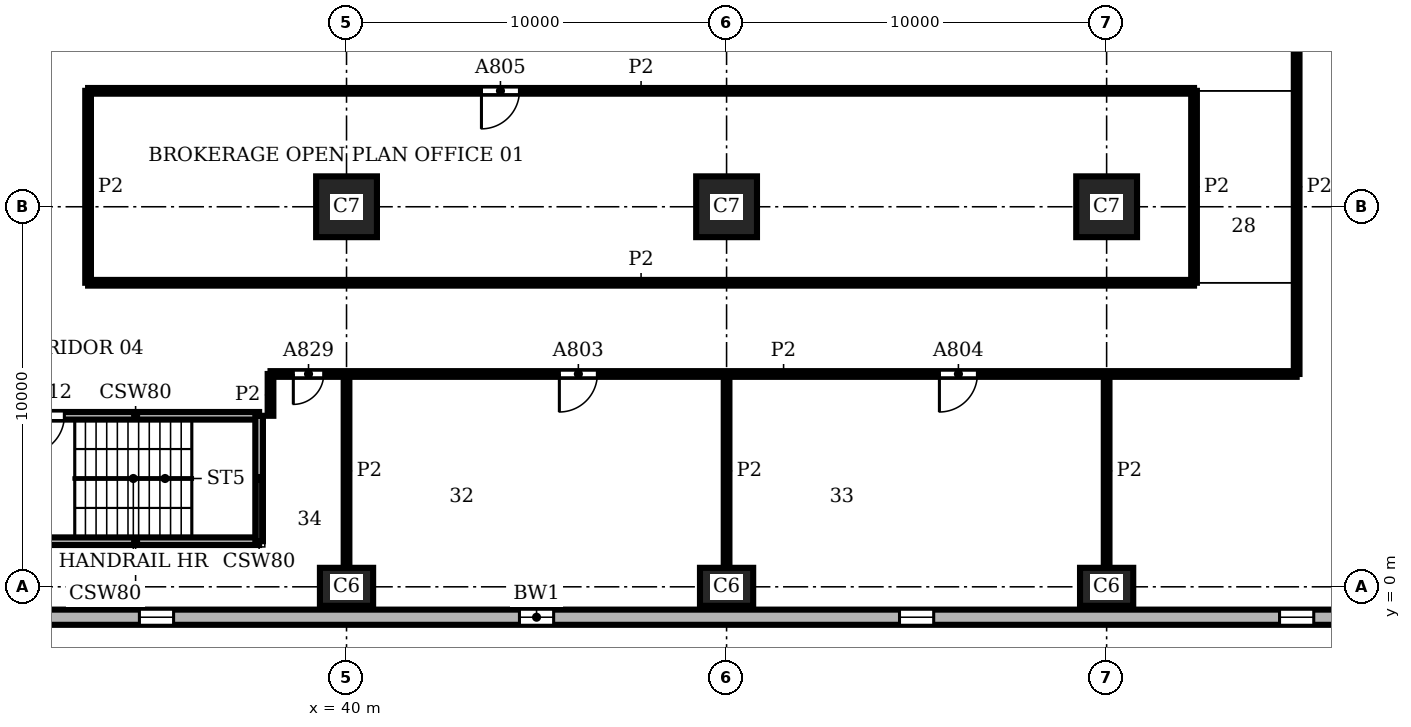
"""IFC4 building model, lengths in metres.
Left out: names, types, materials, properties, quantities, classifications, styles, units other than length and angle.
Written with IfcOpenShell. Run it as: python <this file> out.ifc"""

import sys

from ifc_helpers import new_model, si_unit, direction, frame, frame_2d, origin, origin_2d, place, context, subcontext, project, spatial, rectangle, extrude, element, fill, save


model = new_model("IFC4")
c1 = context("Model", 3, precision=1e-05, world=origin(), true_north=direction((0.0, 1.0)))
c2 = subcontext(c1, "Body", "Model", "MODEL_VIEW")
j1 = project(units=[si_unit("LENGTHUNIT", "METRE"), si_unit("PLANEANGLEUNIT", "RADIAN")], contexts=[c1])
p1 = place(None, origin())
s1 = spatial("IfcSite", under=j1, at=p1, CompositionType="ELEMENT")
p2 = place(p1, origin())
s2 = spatial("IfcBuilding", under=s1, at=p2, CompositionType="ELEMENT")
p3 = place(p2, frame((0.0, 0.0, 93.9)))
s3 = spatial("IfcBuildingStorey", under=s2, at=p3, CompositionType="ELEMENT", Elevation=93.9)
for number, where, z_axis, x_axis in (
    (1, (40.0, 0.0, 0.0), (0.0, 0.0, 1.0), (1.0, 0.0, 0.0)),
    (2, (50.0, 0.0, 0.0), (0.0, 0.0, 1.0), (1.0, 0.0, 0.0)),
    (3, (60.0, 0.0, 0.0), (0.0, 0.0, 1.0), (1.0, 0.0, 0.0)),
):
    element("IfcColumn", number, at=place(p3, frame(where, z_axis=z_axis, x_axis=x_axis)), inside=s3, PredefinedType="COLUMN", context=c2, shape_type="SweptSolid", body=[
        extrude(rectangle(XDim=1.4, YDim=1.0, at=origin_2d()), origin(), (0.0, 0.0, 1.0), 3.9),
    ])
for number, where, z_axis, x_axis in (
    (4, (40.0, 10.0, 0.0), (0.0, 0.0, 1.0), (1.0, 0.0, 0.0)),
    (5, (50.0, 10.0, 0.0), (0.0, 0.0, 1.0), (1.0, 0.0, 0.0)),
    (6, (60.0, 10.0, 0.0), (0.0, 0.0, 1.0), (1.0, 0.0, 0.0)),
):
    element("IfcColumn", number, at=place(p3, frame(where, z_axis=z_axis, x_axis=x_axis)), inside=s3, PredefinedType="COLUMN", context=c2, shape_type="SweptSolid", body=[
        extrude(rectangle(XDim=1.6, YDim=1.6, at=origin_2d()), origin(), (0.0, 0.0, 1.0), 3.9),
    ])
p4 = place(p3, frame((20.8, -0.8, 0.0), z_axis=(0.0, 0.0, 1.0), x_axis=(1.0, 0.0, 0.0)))
e7 = element("IfcWall", 7, at=p4, inside=s3, PredefinedType="SOLIDWALL", context=c2, shape_type="SweptSolid", body=[
    extrude(rectangle(XDim=48.4, YDim=0.4, at=frame_2d((24.2, 0.0))), origin(), (0.0, 0.0, 1.0), 3.9),
])
p5 = place(p4, frame((3.75, 0.0, 0.9)))
e8 = element("IfcOpeningElement", 8, at=p5, cuts=e7, PredefinedType="OPENING", context=c2, shape_type="SweptSolid", body=[
    extrude(rectangle(XDim=0.9, YDim=2.35, at=frame_2d((0.45, 1.175))), frame((0.0, 0.21, 0.0), z_axis=(0.0, -1.0, 0.0), x_axis=(1.0, 0.0, 0.0)), (0.0, 0.0, 1.0), 0.42),
])
p6 = place(p4, frame((13.75, 0.0, 0.9)))
e9 = element("IfcOpeningElement", 9, at=p6, cuts=e7, PredefinedType="OPENING", context=c2, shape_type="SweptSolid", body=[
    extrude(rectangle(XDim=0.9, YDim=2.35, at=frame_2d((0.45, 1.175))), frame((0.0, 0.21, 0.0), z_axis=(0.0, -1.0, 0.0), x_axis=(1.0, 0.0, 0.0)), (0.0, 0.0, 1.0), 0.42),
])
p7 = place(p4, frame((23.75, 0.0, 0.9)))
e10 = element("IfcOpeningElement", 10, at=p7, cuts=e7, PredefinedType="OPENING", context=c2, shape_type="SweptSolid", body=[
    extrude(rectangle(XDim=0.9, YDim=2.35, at=frame_2d((0.45, 1.175))), frame((0.0, 0.21, 0.0), z_axis=(0.0, -1.0, 0.0), x_axis=(1.0, 0.0, 0.0)), (0.0, 0.0, 1.0), 0.42),
])
p8 = place(p4, frame((33.75, 0.0, 0.9)))
e11 = element("IfcOpeningElement", 11, at=p8, cuts=e7, PredefinedType="OPENING", context=c2, shape_type="SweptSolid", body=[
    extrude(rectangle(XDim=0.9, YDim=2.35, at=frame_2d((0.45, 1.175))), frame((0.0, 0.21, 0.0), z_axis=(0.0, -1.0, 0.0), x_axis=(1.0, 0.0, 0.0)), (0.0, 0.0, 1.0), 0.42),
])
p9 = place(p4, frame((43.75, 0.0, 0.9)))
e12 = element("IfcOpeningElement", 12, at=p9, cuts=e7, PredefinedType="OPENING", context=c2, shape_type="SweptSolid", body=[
    extrude(rectangle(XDim=0.9, YDim=2.35, at=frame_2d((0.45, 1.175))), frame((0.0, 0.21, 0.0), z_axis=(0.0, -1.0, 0.0), x_axis=(1.0, 0.0, 0.0)), (0.0, 0.0, 1.0), 0.42),
])
p10 = place(p3, frame((31.2, 1.2, 0.0), z_axis=(0.0, 0.0, 1.0), x_axis=(1.0, 0.0, 0.0)))
e13 = element("IfcWall", 13, at=p10, inside=s3, PredefinedType="SHEAR", context=c2, shape_type="SweptSolid", body=[
    extrude(rectangle(XDim=6.5, YDim=0.2, at=frame_2d((3.25, 0.0))), origin(), (0.0, 0.0, 1.0), 3.58),
])
p11 = place(p3, frame((31.2, 4.5, 0.0), z_axis=(0.0, 0.0, 1.0), x_axis=(1.0, 0.0, 0.0)))
e14 = element("IfcWall", 14, at=p11, inside=s3, PredefinedType="SHEAR", context=c2, shape_type="SweptSolid", body=[
    extrude(rectangle(XDim=6.5, YDim=0.2, at=frame_2d((3.25, 0.0))), origin(), (0.0, 0.0, 1.0), 3.58),
])
p12 = place(p11, frame((0.375, 0.0, 0.0)))
e15 = element("IfcOpeningElement", 15, at=p12, cuts=e14, PredefinedType="OPENING", context=c2, shape_type="SweptSolid", body=[
    extrude(rectangle(XDim=1.0, YDim=2.1, at=frame_2d((0.5, 1.05))), frame((0.0, 0.11, 0.0), z_axis=(0.0, -1.0, 0.0), x_axis=(1.0, 0.0, 0.0)), (0.0, 0.0, 1.0), 0.22),
])
p13 = place(p3, frame((37.7, 1.2, 0.0), z_axis=(0.0, 0.0, 1.0), x_axis=(0.0, 1.0, 0.0)))
e16 = element("IfcWall", 16, at=p13, inside=s3, PredefinedType="SHEAR", context=c2, shape_type="SweptSolid", body=[
    extrude(rectangle(XDim=3.3, YDim=0.2, at=frame_2d((1.65, 0.0))), origin(), (0.0, 0.0, 1.0), 3.58),
])
p14 = place(p3, frame((33.2, 8.0, 0.0), z_axis=(0.0, 0.0, 1.0), x_axis=(0.0, 1.0, 0.0)))
e17 = element("IfcWall", 17, at=p14, inside=s3, PredefinedType="PARTITIONING", context=c2, shape_type="SweptSolid", body=[
    extrude(rectangle(XDim=5.05, YDim=0.15, at=frame_2d((2.525, 0.0))), origin(), (0.0, 0.0, 1.0), 3.58),
])
p15 = place(p3, frame((38.0, 4.5, 0.0), z_axis=(0.0, 0.0, 1.0), x_axis=(0.0, 1.0, 0.0)))
e18 = element("IfcWall", 18, at=p15, inside=s3, PredefinedType="PARTITIONING", context=c2, shape_type="SweptSolid", body=[
    extrude(rectangle(XDim=1.1, YDim=0.15, at=frame_2d((0.55, 0.0))), origin(), (0.0, 0.0, 1.0), 3.58),
])
for number, where, z_axis, x_axis in (
    (19, (40.0, 0.5, 0.0), (0.0, 0.0, 1.0), (0.0, 1.0, 0.0)),
    (20, (50.0, 0.5, 0.0), (0.0, 0.0, 1.0), (0.0, 1.0, 0.0)),
    (21, (60.0, 0.5, 0.0), (0.0, 0.0, 1.0), (0.0, 1.0, 0.0)),
):
    element("IfcWall", number, at=place(p3, frame(where, z_axis=z_axis, x_axis=x_axis)), inside=s3, PredefinedType="PARTITIONING", context=c2, shape_type="SweptSolid", body=[
        extrude(rectangle(XDim=5.1, YDim=0.15, at=frame_2d((2.55, 0.0))), origin(), (0.0, 0.0, 1.0), 3.58),
    ])
p16 = place(p3, frame((62.3, 8.0, 0.0), z_axis=(0.0, 0.0, 1.0), x_axis=(0.0, 1.0, 0.0)))
e22 = element("IfcWall", 22, at=p16, inside=s3, PredefinedType="PARTITIONING", context=c2, shape_type="SweptSolid", body=[
    extrude(rectangle(XDim=5.05, YDim=0.15, at=frame_2d((2.525, 0.0))), origin(), (0.0, 0.0, 1.0), 3.58),
])
p17 = place(p3, frame((65.0, 5.6, 0.0), z_axis=(0.0, 0.0, 1.0), x_axis=(0.0, 1.0, 0.0)))
e23 = element("IfcWall", 23, at=p17, inside=s3, PredefinedType="PARTITIONING", context=c2, shape_type="SweptSolid", body=[
    extrude(rectangle(XDim=9.85, YDim=0.15, at=frame_2d((4.925, 0.0))), origin(), (0.0, 0.0, 1.0), 3.58),
])
p18 = place(p3, frame((38.0, 5.6, 0.0), z_axis=(0.0, 0.0, 1.0), x_axis=(1.0, 0.0, 0.0)))
e24 = element("IfcWall", 24, at=p18, inside=s3, PredefinedType="PARTITIONING", context=c2, shape_type="SweptSolid", body=[
    extrude(rectangle(XDim=27.0, YDim=0.15, at=frame_2d((13.5, 0.0))), origin(), (0.0, 0.0, 1.0), 3.58),
])
p19 = place(p18, frame((7.6, 0.0, 0.0)))
e25 = element("IfcOpeningElement", 25, at=p19, cuts=e24, PredefinedType="OPENING", context=c2, shape_type="SweptSolid", body=[
    extrude(rectangle(XDim=1.0, YDim=2.1, at=frame_2d((0.5, 1.05))), frame((0.0, 0.085, 0.0), z_axis=(0.0, -1.0, 0.0), x_axis=(1.0, 0.0, 0.0)), (0.0, 0.0, 1.0), 0.17),
])
p20 = place(p18, frame((17.6, 0.0, 0.0)))
e26 = element("IfcOpeningElement", 26, at=p20, cuts=e24, PredefinedType="OPENING", context=c2, shape_type="SweptSolid", body=[
    extrude(rectangle(XDim=1.0, YDim=2.1, at=frame_2d((0.5, 1.05))), frame((0.0, 0.085, 0.0), z_axis=(0.0, -1.0, 0.0), x_axis=(1.0, 0.0, 0.0)), (0.0, 0.0, 1.0), 0.17),
])
p21 = place(p18, frame((0.6, 0.0, 0.0)))
e27 = element("IfcOpeningElement", 27, at=p21, cuts=e24, PredefinedType="OPENING", context=c2, shape_type="SweptSolid", body=[
    extrude(rectangle(XDim=0.8, YDim=2.1, at=frame_2d((0.4, 1.05))), frame((0.0, 0.085, 0.0), z_axis=(0.0, -1.0, 0.0), x_axis=(1.0, 0.0, 0.0)), (0.0, 0.0, 1.0), 0.17),
])
p22 = place(p3, frame((33.2, 8.0, 0.0), z_axis=(0.0, 0.0, 1.0), x_axis=(1.0, 0.0, 0.0)))
e28 = element("IfcWall", 28, at=p22, inside=s3, PredefinedType="PARTITIONING", context=c2, shape_type="SweptSolid", body=[
    extrude(rectangle(XDim=29.1, YDim=0.15, at=frame_2d((14.55, 0.0))), origin(), (0.0, 0.0, 1.0), 3.58),
])
p23 = place(p3, frame((33.2, 13.05, 0.0), z_axis=(0.0, 0.0, 1.0), x_axis=(1.0, 0.0, 0.0)))
e29 = element("IfcWall", 29, at=p23, inside=s3, PredefinedType="PARTITIONING", context=c2, shape_type="SweptSolid", body=[
    extrude(rectangle(XDim=29.1, YDim=0.15, at=frame_2d((14.55, 0.0))), origin(), (0.0, 0.0, 1.0), 3.58),
])
p24 = place(p23, frame((10.35, 0.0, 0.0)))
e30 = element("IfcOpeningElement", 30, at=p24, cuts=e29, PredefinedType="OPENING", context=c2, shape_type="SweptSolid", body=[
    extrude(rectangle(XDim=1.0, YDim=2.1, at=frame_2d((0.5, 1.05))), frame((0.0, 0.085, 0.0), z_axis=(0.0, -1.0, 0.0), x_axis=(1.0, 0.0, 0.0)), (0.0, 0.0, 1.0), 0.17),
])
p25 = place(p6, origin())
e31 = element("IfcWindow", 31, at=p25, inside=s3, PartitioningType="SINGLE_PANEL", PredefinedType="WINDOW", context=c2, shape_type="SweptSolid", body=[
    extrude(rectangle(XDim=0.9, YDim=2.35, at=frame_2d((0.45, 1.175))), frame((0.0, 0.16, 0.0), z_axis=(0.0, -1.0, 0.0), x_axis=(1.0, 0.0, 0.0)), (0.0, 0.0, 1.0), 0.06),
])
fill(e9, e31)
p26 = place(p7, origin())
e32 = element("IfcWindow", 32, at=p26, inside=s3, PartitioningType="SINGLE_PANEL", PredefinedType="WINDOW", context=c2, shape_type="SweptSolid", body=[
    extrude(rectangle(XDim=0.9, YDim=2.35, at=frame_2d((0.45, 1.175))), frame((0.0, 0.16, 0.0), z_axis=(0.0, -1.0, 0.0), x_axis=(1.0, 0.0, 0.0)), (0.0, 0.0, 1.0), 0.06),
])
fill(e10, e32)
p27 = place(p8, origin())
e33 = element("IfcWindow", 33, at=p27, inside=s3, PartitioningType="SINGLE_PANEL", PredefinedType="WINDOW", context=c2, shape_type="SweptSolid", body=[
    extrude(rectangle(XDim=0.9, YDim=2.35, at=frame_2d((0.45, 1.175))), frame((0.0, 0.16, 0.0), z_axis=(0.0, -1.0, 0.0), x_axis=(1.0, 0.0, 0.0)), (0.0, 0.0, 1.0), 0.06),
])
fill(e11, e33)
p28 = place(p9, origin())
e34 = element("IfcWindow", 34, at=p28, inside=s3, PartitioningType="SINGLE_PANEL", PredefinedType="WINDOW", context=c2, shape_type="SweptSolid", body=[
    extrude(rectangle(XDim=0.9, YDim=2.35, at=frame_2d((0.45, 1.175))), frame((0.0, 0.16, 0.0), z_axis=(0.0, -1.0, 0.0), x_axis=(1.0, 0.0, 0.0)), (0.0, 0.0, 1.0), 0.06),
])
fill(e12, e34)
p29 = place(p12, frame((1.0, 0.0, 0.0), z_axis=(0.0, 0.0, 1.0), x_axis=(-1.0, 0.0, 0.0)))
e35 = element("IfcDoor", 35, at=p29, inside=s3, OperationType="SINGLE_SWING_RIGHT", PredefinedType="DOOR", context=c2, shape_type="SweptSolid", body=[
    extrude(rectangle(XDim=1.0, YDim=2.1, at=frame_2d((0.5, 1.05))), frame((0.0, 0.025, 0.0), z_axis=(0.0, -1.0, 0.0), x_axis=(1.0, 0.0, 0.0)), (0.0, 0.0, 1.0), 0.05),
])
fill(e15, e35)
p30 = place(p19, frame((1.0, 0.0, 0.0), z_axis=(0.0, 0.0, 1.0), x_axis=(-1.0, 0.0, 0.0)))
e36 = element("IfcDoor", 36, at=p30, inside=s3, OperationType="SINGLE_SWING_RIGHT", PredefinedType="DOOR", context=c2, shape_type="SweptSolid", body=[
    extrude(rectangle(XDim=1.0, YDim=2.1, at=frame_2d((0.5, 1.05))), frame((0.0, 0.025, 0.0), z_axis=(0.0, -1.0, 0.0), x_axis=(1.0, 0.0, 0.0)), (0.0, 0.0, 1.0), 0.05),
])
fill(e25, e36)
p31 = place(p20, frame((1.0, 0.0, 0.0), z_axis=(0.0, 0.0, 1.0), x_axis=(-1.0, 0.0, 0.0)))
e37 = element("IfcDoor", 37, at=p31, inside=s3, OperationType="SINGLE_SWING_RIGHT", PredefinedType="DOOR", context=c2, shape_type="SweptSolid", body=[
    extrude(rectangle(XDim=1.0, YDim=2.1, at=frame_2d((0.5, 1.05))), frame((0.0, 0.025, 0.0), z_axis=(0.0, -1.0, 0.0), x_axis=(1.0, 0.0, 0.0)), (0.0, 0.0, 1.0), 0.05),
])
fill(e26, e37)
p32 = place(p24, frame((1.0, 0.0, 0.0), z_axis=(0.0, 0.0, 1.0), x_axis=(-1.0, 0.0, 0.0)))
e38 = element("IfcDoor", 38, at=p32, inside=s3, OperationType="SINGLE_SWING_RIGHT", PredefinedType="DOOR", context=c2, shape_type="SweptSolid", body=[
    extrude(rectangle(XDim=1.0, YDim=2.1, at=frame_2d((0.5, 1.05))), frame((0.0, 0.025, 0.0), z_axis=(0.0, -1.0, 0.0), x_axis=(1.0, 0.0, 0.0)), (0.0, 0.0, 1.0), 0.05),
])
fill(e30, e38)
p33 = place(p21, frame((0.8, 0.0, 0.0), z_axis=(0.0, 0.0, 1.0), x_axis=(-1.0, 0.0, 0.0)))
e39 = element("IfcDoor", 39, at=p33, inside=s3, OperationType="SINGLE_SWING_RIGHT", PredefinedType="DOOR", context=c2, shape_type="SweptSolid", body=[
    extrude(rectangle(XDim=0.8, YDim=2.1, at=frame_2d((0.4, 1.05))), frame((0.0, 0.025, 0.0), z_axis=(0.0, -1.0, 0.0), x_axis=(1.0, 0.0, 0.0)), (0.0, 0.0, 1.0), 0.05),
])
fill(e27, e39)
save(model, sys.argv[1])
